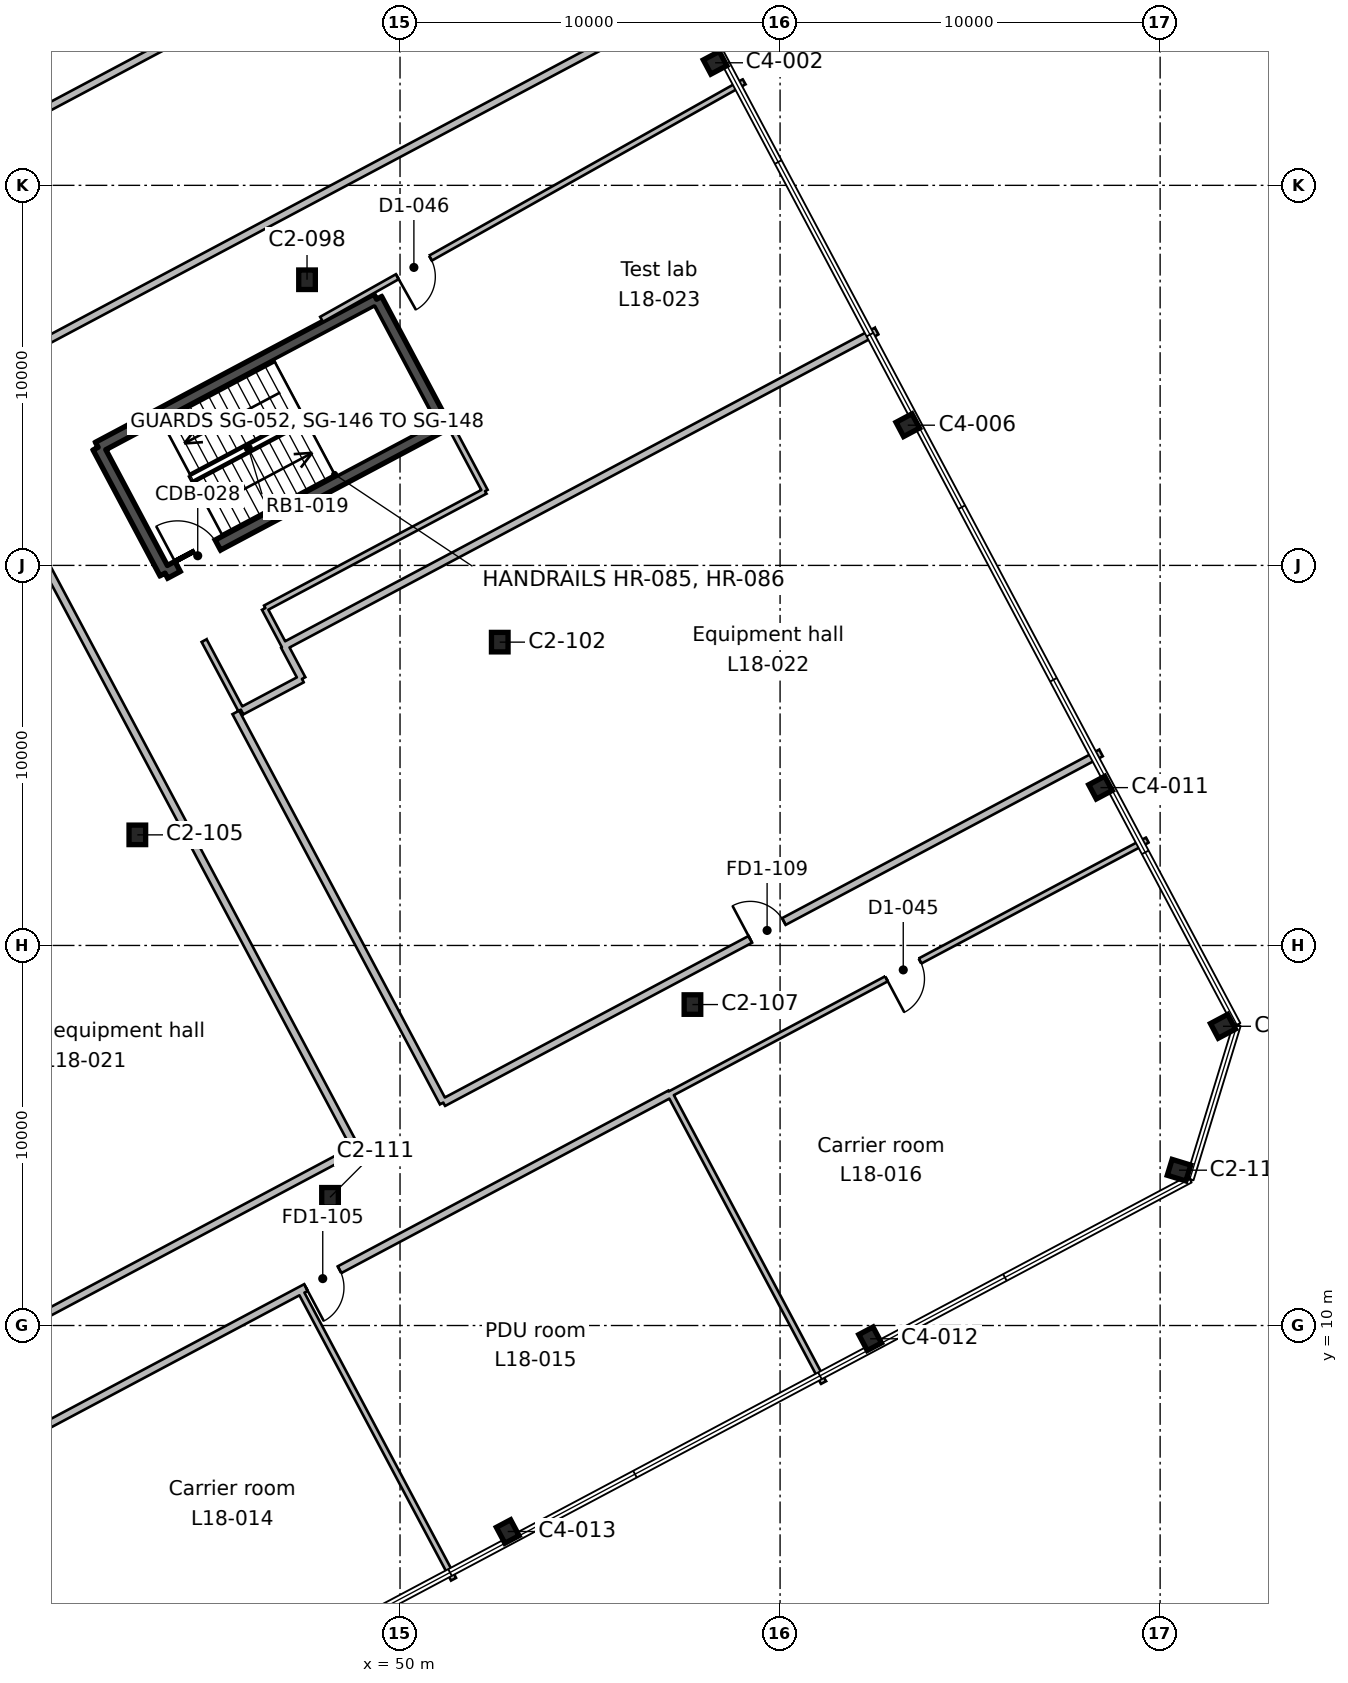
"""IFC4 building model, lengths in metres.
Left out: names, types, materials, properties, quantities, classifications, styles, units other than length and angle.
Written with IfcOpenShell. Run it as: python <this file> out.ifc"""

import sys

from ifc_helpers import new_model, si_unit, direction, frame, frame_2d, origin, origin_2d, place, context, subcontext, project, spatial, rectangle, i_section, extrude, element, fill, save


model = new_model("IFC4")
c1 = context("Model", 3, precision=1e-05, world=origin(), true_north=direction((0.0, 1.0)))
c2 = subcontext(c1, "Body", "Model", "MODEL_VIEW")
j1 = project(units=[si_unit("LENGTHUNIT", "METRE"), si_unit("PLANEANGLEUNIT", "RADIAN")], contexts=[c1])
p1 = place(None, origin())
s1 = spatial("IfcSite", under=j1, at=p1, CompositionType="ELEMENT")
p2 = place(p1, origin())
s2 = spatial("IfcBuilding", under=s1, at=p2, CompositionType="ELEMENT")
p3 = place(p2, frame((0.0, 0.0, 93.8)))
s3 = spatial("IfcBuildingStorey", under=s2, at=p3, CompositionType="ELEMENT", Elevation=93.8)
for number, where, z_axis, x_axis in (
    (1, (52.834, 4.58, 0.0), (0.0, 0.0, 1.0), (0.883, 0.469, 0.0)),
    (2, (62.37, 9.651, 0.0), (0.0, 0.0, 1.0), (0.883, 0.469, 0.0)),
):
    element("IfcColumn", number, at=place(p3, frame(where, z_axis=z_axis, x_axis=x_axis)), inside=s3, PredefinedType="COLUMN", context=c2, shape_type="SweptSolid", body=[
        extrude(i_section(OverallWidth=0.424, OverallDepth=0.475, WebThickness=0.048, FlangeThickness=0.077, FilletRadius=0.015, at=origin_2d()), origin(), (0.0, 0.0, 1.0), 4.6),
    ])
for number, where, z_axis, x_axis in (
    (3, (48.158, 13.374, 0.0), (0.0, 0.0, 1.0), (1.0, 0.0, 0.0)),
    (4, (70.497, 14.087, 0.0), (0.0, 0.0, 1.0), (0.292, 0.956, 0.0)),
    (5, (71.654, 17.873, 0.0), (0.0, 0.0, 1.0), (-0.469, 0.883, 0.0)),
    (6, (57.694, 18.445, 0.0), (0.0, 0.0, 1.0), (1.0, 0.0, 0.0)),
    (7, (43.088, 22.91, 0.0), (0.0, 0.0, 1.0), (1.0, 0.0, 0.0)),
):
    element("IfcColumn", number, at=place(p3, frame(where, z_axis=z_axis, x_axis=x_axis)), inside=s3, PredefinedType="COLUMN", context=c2, shape_type="SweptSolid", body=[
        extrude(i_section(OverallWidth=0.437, OverallDepth=0.513, WebThickness=0.061, FlangeThickness=0.097, FilletRadius=0.015, at=origin_2d()), origin(), (0.0, 0.0, 1.0), 4.6),
    ])
p4 = place(p3, frame((68.431, 24.153, 0.0), z_axis=(0.0, 0.0, 1.0), x_axis=(-0.469471562786, 0.882947592859, 0.0)))
e8 = element("IfcColumn", 8, at=p4, inside=s3, PredefinedType="COLUMN", context=c2, shape_type="SweptSolid", body=[
    extrude(i_section(OverallWidth=0.424, OverallDepth=0.475, WebThickness=0.048, FlangeThickness=0.077, FilletRadius=0.015, at=origin_2d()), origin(), (0.0, 0.0, 1.0), 4.6),
])
p5 = place(p3, frame((52.624, 27.981, 0.0), z_axis=(0.0, 0.0, 1.0), x_axis=(1.0, 0.0, 0.0)))
e9 = element("IfcColumn", 9, at=p5, inside=s3, PredefinedType="COLUMN", context=c2, shape_type="SweptSolid", body=[
    extrude(i_section(OverallWidth=0.437, OverallDepth=0.513, WebThickness=0.061, FlangeThickness=0.097, FilletRadius=0.015, at=origin_2d()), origin(), (0.0, 0.0, 1.0), 4.6),
])
p6 = place(p3, frame((63.36, 33.689, 0.0), z_axis=(0.0, 0.0, 1.0), x_axis=(-0.469471562786, 0.882947592859, 0.0)))
e10 = element("IfcColumn", 10, at=p6, inside=s3, PredefinedType="COLUMN", context=c2, shape_type="SweptSolid", body=[
    extrude(i_section(OverallWidth=0.424, OverallDepth=0.475, WebThickness=0.048, FlangeThickness=0.077, FilletRadius=0.015, at=origin_2d()), origin(), (0.0, 0.0, 1.0), 4.6),
])
p7 = place(p3, frame((47.553, 37.516, 0.0), z_axis=(0.0, 0.0, 1.0), x_axis=(1.0, 0.0, 0.0)))
e11 = element("IfcColumn", 11, at=p7, inside=s3, PredefinedType="COLUMN", context=c2, shape_type="SweptSolid", body=[
    extrude(i_section(OverallWidth=0.437, OverallDepth=0.513, WebThickness=0.061, FlangeThickness=0.097, FilletRadius=0.015, at=origin_2d()), origin(), (0.0, 0.0, 1.0), 4.6),
])
p8 = place(p3, frame((58.29, 43.225, 0.0), z_axis=(0.0, 0.0, 1.0), x_axis=(-0.469471562786, 0.882947592859, 0.0)))
e12 = element("IfcColumn", 12, at=p8, inside=s3, PredefinedType="COLUMN", context=c2, shape_type="SweptSolid", body=[
    extrude(i_section(OverallWidth=0.424, OverallDepth=0.475, WebThickness=0.048, FlangeThickness=0.077, FilletRadius=0.015, at=origin_2d()), origin(), (0.0, 0.0, 1.0), 4.6),
])
p9 = place(p3, frame((49.384, 37.004, 0.0), z_axis=(0.0, 0.0, 1.0), x_axis=(0.46946936446, -0.882948761726, 0.0)))
e13 = element("IfcWall", 13, at=p9, inside=s3, PredefinedType="SHEAR", context=c2, shape_type="SweptSolid", body=[
    extrude(rectangle(XDim=3.75, YDim=0.3, at=frame_2d((1.875, 0.0))), origin(), (0.0, 0.0, 1.0), 4.6),
])
p10 = place(p3, frame((51.145, 33.693, 0.0), z_axis=(0.0, 0.0, 1.0), x_axis=(-0.882945809314, -0.469474917132, 0.0)))
e14 = element("IfcWall", 14, at=p10, inside=s3, PredefinedType="SHEAR", context=c2, shape_type="SweptSolid", body=[
    extrude(rectangle(XDim=8.3, YDim=0.3, at=frame_2d((4.15, 0.0))), origin(), (0.0, 0.0, 1.0), 4.6),
])
p11 = place(p10, frame((6.725, 0.0, 0.0)))
e15 = element("IfcOpeningElement", 15, at=p11, cuts=e14, PredefinedType="OPENING", context=c2, shape_type="SweptSolid", body=[
    extrude(rectangle(XDim=1.2, YDim=2.1, at=frame_2d((0.6, 1.05))), frame((0.0, 0.16, 0.0), z_axis=(0.0, -1.0, 0.0), x_axis=(1.0, 0.0, 0.0)), (0.0, 0.0, 1.0), 0.32),
])
p12 = place(p3, frame((43.816, 29.796, 0.0), z_axis=(0.0, 0.0, 1.0), x_axis=(-0.46946936446, 0.882948761726, 0.0)))
e16 = element("IfcWall", 16, at=p12, inside=s3, PredefinedType="SHEAR", context=c2, shape_type="SweptSolid", body=[
    extrude(rectangle(XDim=3.75, YDim=0.3, at=frame_2d((1.875, 0.0))), origin(), (0.0, 0.0, 1.0), 4.6),
])
p13 = place(p3, frame((42.055, 33.107, 0.0), z_axis=(0.0, 0.0, 1.0), x_axis=(0.882945809314, 0.469474917132, 0.0)))
e17 = element("IfcWall", 17, at=p13, inside=s3, PredefinedType="SHEAR", context=c2, shape_type="SweptSolid", body=[
    extrude(rectangle(XDim=8.3, YDim=0.3, at=frame_2d((4.15, 0.0))), origin(), (0.0, 0.0, 1.0), 4.6),
])
p14 = place(p3, frame((0.0, 14.27, 0.0), z_axis=(0.0, 0.0, 1.0), x_axis=(0.882946949892, 0.46947277203, 0.0)))
e18 = element("IfcWall", 18, at=p14, inside=s3, PredefinedType="PARTITIONING", context=c2, shape_type="SweptSolid", body=[
    extrude(rectangle(XDim=65.501, YDim=0.2, at=frame_2d((32.75, 0.0))), origin(), (0.0, 0.0, 1.0), 4.2),
])
p15 = place(p14, frame((35.45, 0.0, 0.0)))
e19 = element("IfcOpeningElement", 19, at=p15, cuts=e18, PredefinedType="OPENING", context=c2, shape_type="SweptSolid", body=[
    extrude(rectangle(XDim=1.0, YDim=2.1, at=frame_2d((0.5, 1.05))), frame((0.0, 0.11, 0.0), z_axis=(0.0, -1.0, 0.0), x_axis=(1.0, 0.0, 0.0)), (0.0, 0.0, 1.0), 0.22),
])
p16 = place(p14, frame((32.05, 0.0, 0.0)))
e20 = element("IfcOpeningElement", 20, at=p16, cuts=e18, PredefinedType="OPENING", context=c2, shape_type="SweptSolid", body=[
    extrude(rectangle(XDim=1.0, YDim=2.1, at=frame_2d((0.5, 1.05))), frame((0.0, 0.11, 0.0), z_axis=(0.0, -1.0, 0.0), x_axis=(1.0, 0.0, 0.0)), (0.0, 0.0, 1.0), 0.22),
])
p17 = place(p14, frame((29.65, 0.0, 0.0)))
e21 = element("IfcOpeningElement", 21, at=p17, cuts=e18, PredefinedType="OPENING", context=c2, shape_type="SweptSolid", body=[
    extrude(rectangle(XDim=1.0, YDim=2.1, at=frame_2d((0.5, 1.05))), frame((0.0, 0.11, 0.0), z_axis=(0.0, -1.0, 0.0), x_axis=(1.0, 0.0, 0.0)), (0.0, 0.0, 1.0), 0.22),
])
p18 = place(p14, frame((13.85, 0.0, 0.0)))
e22 = element("IfcOpeningElement", 22, at=p18, cuts=e18, PredefinedType="OPENING", context=c2, shape_type="SweptSolid", body=[
    extrude(rectangle(XDim=1.0, YDim=2.1, at=frame_2d((0.5, 1.05))), frame((0.0, 0.11, 0.0), z_axis=(0.0, -1.0, 0.0), x_axis=(1.0, 0.0, 0.0)), (0.0, 0.0, 1.0), 0.22),
])
p19 = place(p3, frame((57.105, 16.093, 0.0), z_axis=(0.0, 0.0, 1.0), x_axis=(-0.882946553343, -0.469473517827, 0.0)))
e23 = element("IfcWall", 23, at=p19, inside=s3, PredefinedType="PARTITIONING", context=c2, shape_type="SweptSolid", body=[
    extrude(rectangle(XDim=49.272, YDim=0.2, at=frame_2d((24.636, 0.0))), origin(), (0.0, 0.0, 1.0), 4.2),
])
p20 = place(p19, frame((27.75, 0.0, 0.0)))
e24 = element("IfcOpeningElement", 24, at=p20, cuts=e23, PredefinedType="OPENING", context=c2, shape_type="SweptSolid", body=[
    extrude(rectangle(XDim=1.0, YDim=2.1, at=frame_2d((0.5, 1.05))), frame((0.0, 0.11, 0.0), z_axis=(0.0, -1.0, 0.0), x_axis=(1.0, 0.0, 0.0)), (0.0, 0.0, 1.0), 0.22),
])
p21 = place(p19, frame((24.15, 0.0, 0.0)))
e25 = element("IfcOpeningElement", 25, at=p21, cuts=e23, PredefinedType="OPENING", context=c2, shape_type="SweptSolid", body=[
    extrude(rectangle(XDim=1.0, YDim=2.1, at=frame_2d((0.5, 1.05))), frame((0.0, 0.11, 0.0), z_axis=(0.0, -1.0, 0.0), x_axis=(1.0, 0.0, 0.0)), (0.0, 0.0, 1.0), 0.22),
])
p22 = place(p19, frame((9.85, 0.0, 0.0)))
e26 = element("IfcOpeningElement", 26, at=p22, cuts=e23, PredefinedType="OPENING", context=c2, shape_type="SweptSolid", body=[
    extrude(rectangle(XDim=1.0, YDim=2.1, at=frame_2d((0.5, 1.05))), frame((0.0, 0.11, 0.0), z_axis=(0.0, -1.0, 0.0), x_axis=(1.0, 0.0, 0.0)), (0.0, 0.0, 1.0), 0.22),
])
p23 = place(p3, frame((47.372, 10.918, 0.0), z_axis=(0.0, 0.0, 1.0), x_axis=(0.469298440423, -0.883039621884, 0.0)))
e27 = element("IfcWall", 27, at=p23, inside=s3, PredefinedType="PARTITIONING", context=c2, shape_type="SweptSolid", body=[
    extrude(rectangle(XDim=8.6, YDim=0.15, at=frame_2d((4.3, 0.0))), origin(), (0.0, 0.0, 1.0), 4.2),
])
p24 = place(p3, frame((38.028, 40.607, 0.0), z_axis=(0.0, 0.0, 1.0), x_axis=(0.882955326711, 0.469457017237, 0.0)))
e28 = element("IfcWall", 28, at=p24, inside=s3, PredefinedType="PARTITIONING", context=c2, shape_type="SweptSolid", body=[
    extrude(rectangle(XDim=19.576, YDim=0.2, at=frame_2d((9.788, 0.0))), origin(), (0.0, 0.0, 1.0), 4.2),
])
p25 = place(p3, frame((59.054, 42.725, 0.0), z_axis=(0.0, 0.0, 1.0), x_axis=(-0.871718625081, -0.490006774124, 0.0)))
e29 = element("IfcWall", 29, at=p25, inside=s3, PredefinedType="PARTITIONING", context=c2, shape_type="SweptSolid", body=[
    extrude(rectangle(XDim=12.755, YDim=0.15, at=frame_2d((6.378, 0.0))), origin(), (0.0, 0.0, 1.0), 4.2),
])
p26 = place(p25, frame((9.468, 0.0, 0.0)))
e30 = element("IfcOpeningElement", 30, at=p26, cuts=e29, PredefinedType="OPENING", context=c2, shape_type="SweptSolid", body=[
    extrude(rectangle(XDim=1.0, YDim=2.1, at=frame_2d((0.5, 1.05))), frame((0.0, 0.085, 0.0), z_axis=(0.0, -1.0, 0.0), x_axis=(1.0, 0.0, 0.0)), (0.0, 0.0, 1.0), 0.17),
])
p27 = place(p3, frame((45.811, 26.202, 0.0), z_axis=(0.0, 0.0, 1.0), x_axis=(-0.469172559653, 0.883106510716, 0.0)))
e31 = element("IfcWall", 31, at=p27, inside=s3, PredefinedType="PARTITIONING", context=c2, shape_type="SweptSolid", body=[
    extrude(rectangle(XDim=2.06, YDim=0.15, at=frame_2d((1.03, 0.0))), origin(), (0.0, 0.0, 1.0), 4.2),
])
p28 = place(p3, frame((45.679, 26.132, 0.0), z_axis=(0.0, 0.0, 1.0), x_axis=(0.469471943685, -0.882947390331, 0.0)))
e32 = element("IfcWall", 32, at=p28, inside=s3, PredefinedType="PARTITIONING", context=c2, shape_type="SweptSolid", body=[
    extrude(rectangle(XDim=11.628, YDim=0.2, at=frame_2d((5.814, 0.0))), origin(), (0.0, 0.0, 1.0), 4.2),
])
p29 = place(p3, frame((46.958, 27.881, 0.0), z_axis=(0.0, 0.0, 1.0), x_axis=(0.469300305861, -0.883038630479, 0.0)))
e33 = element("IfcWall", 33, at=p29, inside=s3, PredefinedType="PARTITIONING", context=c2, shape_type="SweptSolid", body=[
    extrude(rectangle(XDim=0.984, YDim=0.2, at=frame_2d((0.492, 0.0))), origin(), (0.0, 0.0, 1.0), 4.2),
])
p30 = place(p3, frame((47.42, 27.012, 0.0), z_axis=(0.0, 0.0, 1.0), x_axis=(-0.88313680222, -0.46911553861, 0.0)))
e34 = element("IfcWall", 34, at=p30, inside=s3, PredefinedType="PARTITIONING", context=c2, shape_type="SweptSolid", body=[
    extrude(rectangle(XDim=1.799, YDim=0.2, at=frame_2d((0.899, 0.0))), origin(), (0.0, 0.0, 1.0), 4.2),
])
p31 = place(p3, frame((52.239, 31.953, 0.0), z_axis=(0.0, 0.0, 1.0), x_axis=(-0.882908561856, -0.469544962065, 0.0)))
e35 = element("IfcWall", 35, at=p31, inside=s3, PredefinedType="PARTITIONING", context=c2, shape_type="SweptSolid", body=[
    extrude(rectangle(XDim=6.549, YDim=0.15, at=frame_2d((3.274, 0.0))), origin(), (0.0, 0.0, 1.0), 4.2),
])
p32 = place(p3, frame((52.239, 31.953, 0.0), z_axis=(0.0, 0.0, 1.0), x_axis=(-0.469697898274, 0.882827210929, 0.0)))
e36 = element("IfcWall", 36, at=p32, inside=s3, PredefinedType="PARTITIONING", context=c2, shape_type="SweptSolid", body=[
    extrude(rectangle(XDim=2.05, YDim=0.15, at=frame_2d((1.025, 0.0))), origin(), (0.0, 0.0, 1.0), 4.2),
])
p33 = place(p3, frame((46.434, 28.866, 0.0), z_axis=(0.0, 0.0, 1.0), x_axis=(0.469656526593, -0.882849221005, 0.0)))
e37 = element("IfcWall", 37, at=p33, inside=s3, PredefinedType="PARTITIONING", context=c2, shape_type="SweptSolid", body=[
    extrude(rectangle(XDim=1.115, YDim=0.15, at=frame_2d((0.558, 0.0))), origin(), (0.0, 0.0, 1.0), 4.2),
])
p34 = place(p3, frame((62.542, 36.166, 0.0), z_axis=(0.0, 0.0, 1.0), x_axis=(-0.8829766993, -0.469416817438, 0.0)))
e38 = element("IfcWall", 38, at=p34, inside=s3, PredefinedType="PARTITIONING", context=c2, shape_type="SweptSolid", body=[
    extrude(rectangle(XDim=17.649, YDim=0.2, at=frame_2d((8.825, 0.0))), origin(), (0.0, 0.0, 1.0), 4.2),
])
p35 = place(p3, frame((51.138, 15.865, 0.0), z_axis=(0.0, 0.0, 1.0), x_axis=(0.882966979162, 0.469435100636, 0.0)))
e39 = element("IfcWall", 39, at=p35, inside=s3, PredefinedType="PARTITIONING", context=c2, shape_type="SweptSolid", body=[
    extrude(rectangle(XDim=19.6, YDim=0.2, at=frame_2d((9.8, 0.0))), origin(), (0.0, 0.0, 1.0), 4.2),
])
p36 = place(p35, frame((9.15, 0.0, 0.0)))
e40 = element("IfcOpeningElement", 40, at=p36, cuts=e39, PredefinedType="OPENING", context=c2, shape_type="SweptSolid", body=[
    extrude(rectangle(XDim=1.0, YDim=2.1, at=frame_2d((0.5, 1.05))), frame((0.0, 0.11, 0.0), z_axis=(0.0, -1.0, 0.0), x_axis=(1.0, 0.0, 0.0)), (0.0, 0.0, 1.0), 0.22),
])
p37 = place(p3, frame((57.105, 16.093, 0.0), z_axis=(0.0, 0.0, 1.0), x_axis=(0.469409112223, -0.882980795579, 0.0)))
e41 = element("IfcWall", 41, at=p37, inside=s3, PredefinedType="PARTITIONING", context=c2, shape_type="SweptSolid", body=[
    extrude(rectangle(XDim=8.6, YDim=0.15, at=frame_2d((4.3, 0.0))), origin(), (0.0, 0.0, 1.0), 4.2),
])
p38 = place(p3, frame((57.105, 16.093, 0.0), z_axis=(0.0, 0.0, 1.0), x_axis=(0.882869815227, 0.469617812015, 0.0)))
e42 = element("IfcWall", 42, at=p38, inside=s3, PredefinedType="PARTITIONING", context=c2, shape_type="SweptSolid", body=[
    extrude(rectangle(XDim=14.224, YDim=0.15, at=frame_2d((7.112, 0.0))), origin(), (0.0, 0.0, 1.0), 4.2),
])
p39 = place(p38, frame((6.45, 0.0, 0.0)))
e43 = element("IfcOpeningElement", 43, at=p39, cuts=e42, PredefinedType="OPENING", context=c2, shape_type="SweptSolid", body=[
    extrude(rectangle(XDim=1.0, YDim=2.1, at=frame_2d((0.5, 1.05))), frame((0.0, 0.085, 0.0), z_axis=(0.0, -1.0, 0.0), x_axis=(1.0, 0.0, 0.0)), (0.0, 0.0, 1.0), 0.17),
])
p40 = place(p3, frame((39.453, 32.303, 0.0), z_axis=(0.0, 0.0, 1.0), x_axis=(0.469461333319, -0.882953031887, 0.0)))
e44 = element("IfcWall", 44, at=p40, inside=s3, PredefinedType="PARTITIONING", context=c2, shape_type="SweptSolid", body=[
    extrude(rectangle(XDim=20.0, YDim=0.2, at=frame_2d((10.0, 0.0))), origin(), (0.0, 0.0, 1.0), 4.2),
])
p41 = place(p3, frame((48.842, 14.644, 0.0), z_axis=(0.0, 0.0, 1.0), x_axis=(-0.882924718888, -0.46951457994, 0.0)))
e45 = element("IfcWall", 45, at=p41, inside=s3, PredefinedType="PARTITIONING", context=c2, shape_type="SweptSolid", body=[
    extrude(rectangle(XDim=10.0, YDim=0.2, at=frame_2d((5.0, 0.0))), origin(), (0.0, 0.0, 1.0), 4.2),
])
p42 = place(p11, frame((1.2, 0.0, 0.0), z_axis=(0.0, 0.0, 1.0), x_axis=(-1.0, 0.0, 0.0)))
e46 = element("IfcDoor", 46, at=p42, inside=s3, OperationType="SINGLE_SWING_LEFT", PredefinedType="DOOR", context=c2, shape_type="SweptSolid", body=[
    extrude(rectangle(XDim=1.2, YDim=2.1, at=frame_2d((0.6, 1.05))), frame((0.0, 0.025, 0.0), z_axis=(0.0, -1.0, 0.0), x_axis=(1.0, 0.0, 0.0)), (0.0, 0.0, 1.0), 0.05),
])
fill(e15, e46)
p43 = place(p22, origin())
e47 = element("IfcDoor", 47, at=p43, inside=s3, OperationType="SINGLE_SWING_RIGHT", PredefinedType="DOOR", context=c2, shape_type="SweptSolid", body=[
    extrude(rectangle(XDim=1.0, YDim=2.1, at=frame_2d((0.5, 1.05))), frame((0.0, 0.025, 0.0), z_axis=(0.0, -1.0, 0.0), x_axis=(1.0, 0.0, 0.0)), (0.0, 0.0, 1.0), 0.05),
])
fill(e26, e47)
p44 = place(p39, frame((1.0, 0.0, 0.0), z_axis=(0.0, 0.0, 1.0), x_axis=(-1.0, 0.0, 0.0)))
e48 = element("IfcDoor", 48, at=p44, inside=s3, OperationType="SINGLE_SWING_RIGHT", PredefinedType="DOOR", context=c2, shape_type="SweptSolid", body=[
    extrude(rectangle(XDim=1.0, YDim=2.1, at=frame_2d((0.5, 1.05))), frame((0.0, 0.025, 0.0), z_axis=(0.0, -1.0, 0.0), x_axis=(1.0, 0.0, 0.0)), (0.0, 0.0, 1.0), 0.05),
])
fill(e43, e48)
p45 = place(p36, origin())
e49 = element("IfcDoor", 49, at=p45, inside=s3, OperationType="SINGLE_SWING_LEFT", PredefinedType="DOOR", context=c2, shape_type="SweptSolid", body=[
    extrude(rectangle(XDim=1.0, YDim=2.1, at=frame_2d((0.5, 1.05))), frame((0.0, 0.025, 0.0), z_axis=(0.0, -1.0, 0.0), x_axis=(1.0, 0.0, 0.0)), (0.0, 0.0, 1.0), 0.05),
])
fill(e40, e49)
p46 = place(p26, origin())
e50 = element("IfcDoor", 50, at=p46, inside=s3, OperationType="SINGLE_SWING_RIGHT", PredefinedType="DOOR", context=c2, shape_type="SweptSolid", body=[
    extrude(rectangle(XDim=1.0, YDim=2.1, at=frame_2d((0.5, 1.05))), frame((0.0, 0.025, 0.0), z_axis=(0.0, -1.0, 0.0), x_axis=(1.0, 0.0, 0.0)), (0.0, 0.0, 1.0), 0.05),
])
fill(e30, e50)
save(model, sys.argv[1])
